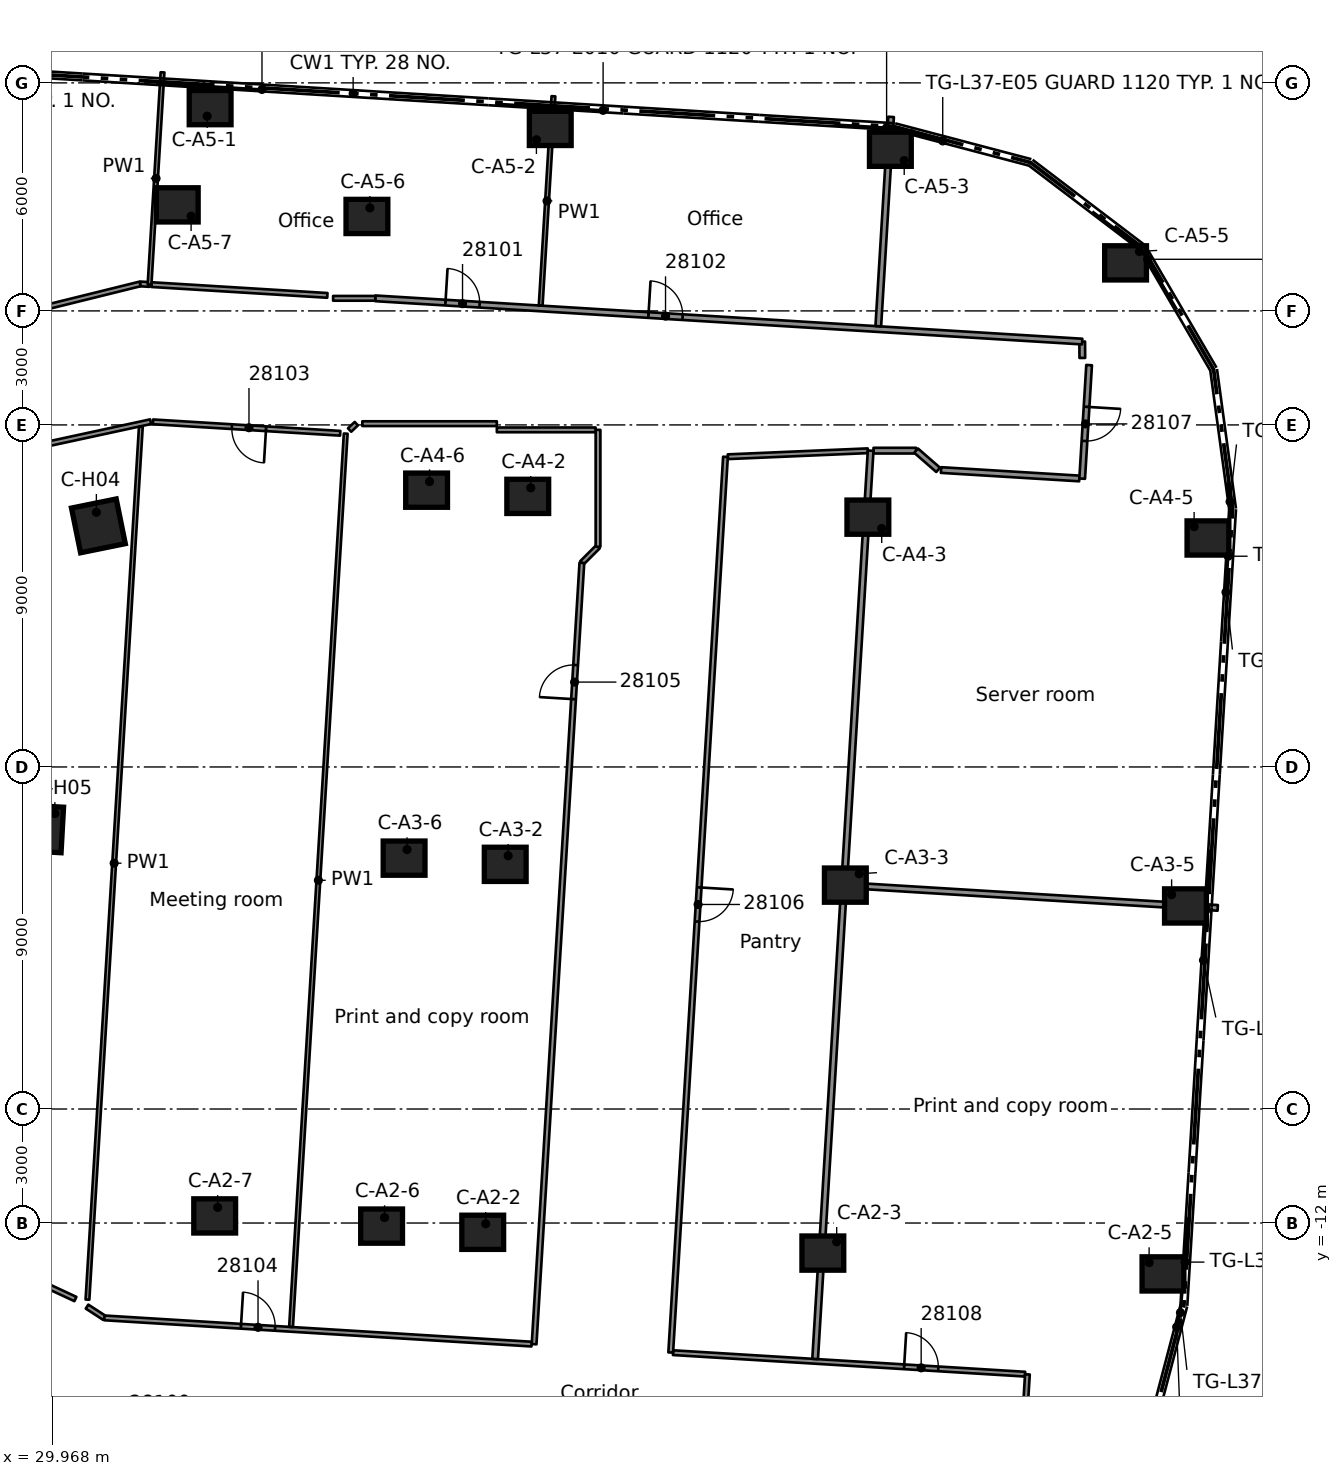
"""IFC4 building model, lengths in metres.
Left out: names, types, materials, properties, quantities, classifications, styles, units other than length and angle.
Written with IfcOpenShell. Run it as: python <this file> out.ifc"""

import sys

from ifc_helpers import new_model, si_unit, direction, frame, frame_2d, origin, origin_2d, place, context, subcontext, project, spatial, rectangle, extrude, element, fill, save


model = new_model("IFC4")
c1 = context("Model", 3, precision=1e-05, world=origin(), true_north=direction((0.0, 1.0)))
c2 = subcontext(c1, "Body", "Model", "MODEL_VIEW")
j1 = project(units=[si_unit("LENGTHUNIT", "METRE"), si_unit("PLANEANGLEUNIT", "RADIAN")], contexts=[c1])
p1 = place(None, origin())
s1 = spatial("IfcSite", under=j1, at=p1, CompositionType="ELEMENT")
p2 = place(p1, origin())
s2 = spatial("IfcBuilding", under=s1, at=p2, CompositionType="ELEMENT")
p3 = place(p2, frame((0.0, 0.0, 145.6)))
s3 = spatial("IfcBuildingStorey", under=s2, at=p3, CompositionType="ELEMENT", Elevation=145.6)
for number, where, z_axis, x_axis in (
    (1, (41.296, -12.244, 0.0), (0.0, 0.0, 1.0), (1.0, 0.0, 0.0)),
    (2, (50.246, -12.791, 0.0), (0.0, 0.0, 1.0), (1.0, 0.0, 0.0)),
    (3, (59.196, -13.339, 0.0), (0.0, 0.0, 1.0), (1.0, 0.0, 0.0)),
    (4, (38.635, -12.081, 0.0), (0.0, 0.0, 1.0), (1.0, 0.0, 0.0)),
    (5, (34.243, -11.813, 0.0), (0.0, 0.0, 1.0), (1.0, 0.0, 0.0)),
    (6, (41.888, -2.562, 0.0), (0.0, 0.0, 1.0), (1.0, 0.0, 0.0)),
    (7, (50.838, -3.109, 0.0), (0.0, 0.0, 1.0), (1.0, 0.0, 0.0)),
    (8, (59.788, -3.657, 0.0), (0.0, 0.0, 1.0), (1.0, 0.0, 0.0)),
    (9, (39.227, -2.399, 0.0), (0.0, 0.0, 1.0), (1.0, 0.0, 0.0)),
    (10, (42.481, 7.12, 0.0), (0.0, 0.0, 1.0), (1.0, 0.0, 0.0)),
    (11, (51.431, 6.573, 0.0), (0.0, 0.0, 1.0), (1.0, 0.0, 0.0)),
    (12, (60.38, 6.025, 0.0), (0.0, 0.0, 1.0), (1.0, 0.0, 0.0)),
    (13, (39.819, 7.283, 0.0), (0.0, 0.0, 1.0), (1.0, 0.0, 0.0)),
    (14, (34.123, 17.349, 0.0), (0.0, 0.0, 1.0), (1.0, 0.0, 0.0)),
    (15, (43.073, 16.802, 0.0), (0.0, 0.0, 1.0), (1.0, 0.0, 0.0)),
    (16, (52.023, 16.254, 0.0), (0.0, 0.0, 1.0), (1.0, 0.0, 0.0)),
    (17, (58.212, 13.264, 0.0), (0.0, 0.0, 1.0), (1.0, 0.0, 0.0)),
    (18, (38.249, 14.485, 0.0), (0.0, 0.0, 1.0), (1.0, 0.0, 0.0)),
    (19, (33.258, 14.79, 0.0), (0.0, 0.0, 1.0), (1.0, 0.0, 0.0)),
):
    element("IfcColumn", number, at=place(p3, frame(where, z_axis=z_axis, x_axis=x_axis)), inside=s3, PredefinedType="COLUMN", context=c2, shape_type="SweptSolid", body=[
        extrude(rectangle(XDim=1.1, YDim=0.9, at=origin_2d()), origin(), (0.0, 0.0, 1.0), 3.5),
    ])
for number, where, z_axis, x_axis in (
    (20, (31.183, 6.344, 0.0), (0.0, 0.0, 1.0), (0.98, 0.199, 0.0)),
    (21, (29.634, -1.625, 0.0), (0.0, 0.0, 1.0), (0.998, -0.055, 0.0)),
):
    element("IfcColumn", number, at=place(p3, frame(where, z_axis=z_axis, x_axis=x_axis)), inside=s3, PredefinedType="COLUMN", context=c2, shape_type="SweptSolid", body=[
        extrude(rectangle(XDim=1.2, YDim=1.2, at=origin_2d()), origin(), (0.0, 0.0, 1.0), 3.5),
    ])
p4 = place(p3, frame((57.071, 11.193, 0.0), z_axis=(0.0, 0.0, 1.0), x_axis=(0.006794860122, -0.999976914671, 0.0)))
e22 = element("IfcWall", 22, at=p4, inside=s3, PredefinedType="PARTITIONING", context=c2, shape_type="SweptSolid", body=[
    extrude(rectangle(XDim=0.431, YDim=0.15, at=frame_2d((0.216, 0.0))), origin(), (0.0, 0.0, 1.0), 3.08),
])
p5 = place(p3, frame((26.05, -14.969, 0.0), z_axis=(0.0, 0.0, 1.0), x_axis=(0.802733003706, -0.596338599087, 0.0)))
e23 = element("IfcWall", 23, at=p5, inside=s3, PredefinedType="PARTITIONING", context=c2, shape_type="SweptSolid", body=[
    extrude(rectangle(XDim=4.927, YDim=0.125, at=frame_2d((2.463, 0.0))), origin(), (0.0, 0.0, 1.0), 3.08),
])
p6 = place(p3, frame((30.578, -14.0, 0.0), z_axis=(0.0, 0.0, 1.0), x_axis=(-0.906684476779, 0.421809506257, 0.0)))
e24 = element("IfcWall", 24, at=p6, inside=s3, PredefinedType="PARTITIONING", context=c2, shape_type="SweptSolid", body=[
    extrude(rectangle(XDim=5.927, YDim=0.125, at=frame_2d((2.963, 0.0))), origin(), (0.0, 0.0, 1.0), 3.08),
])
p7 = place(p3, frame((30.884, -14.199, 0.0), z_axis=(0.0, 0.0, 1.0), x_axis=(0.838402684299, -0.545051317731, 0.0)))
e25 = element("IfcWall", 25, at=p7, inside=s3, PredefinedType="PARTITIONING", context=c2, shape_type="SweptSolid", body=[
    extrude(rectangle(XDim=0.545, YDim=0.125, at=frame_2d((0.272, 0.0))), origin(), (0.0, 0.0, 1.0), 3.08),
])
p8 = place(p3, frame((31.341, -14.496, 0.0), z_axis=(0.0, 0.0, 1.0), x_axis=(0.998121712121, -0.061262123633, 0.0)))
e26 = element("IfcWall", 26, at=p8, inside=s3, PredefinedType="PARTITIONING", context=c2, shape_type="SweptSolid", body=[
    extrude(rectangle(XDim=11.262, YDim=0.125, at=frame_2d((5.631, 0.0))), origin(), (0.0, 0.0, 1.0), 3.08),
])
p9 = place(p8, frame((3.6, 0.0, 0.0)))
e27 = element("IfcOpeningElement", 27, at=p9, cuts=e26, PredefinedType="OPENING", context=c2, shape_type="SweptSolid", body=[
    extrude(rectangle(XDim=0.9, YDim=2.1, at=frame_2d((0.45, 1.05))), frame((0.0, 0.073, 0.0), z_axis=(0.0, -1.0, 0.0), x_axis=(1.0, 0.0, 0.0)), (0.0, 0.0, 1.0), 0.145),
])
p10 = place(p3, frame((46.305, -15.411, 0.0), z_axis=(0.0, 0.0, 1.0), x_axis=(0.998136924193, -0.061013773551, 0.0)))
e28 = element("IfcWall", 28, at=p10, inside=s3, PredefinedType="PARTITIONING", context=c2, shape_type="SweptSolid", body=[
    extrude(rectangle(XDim=9.279, YDim=0.125, at=frame_2d((4.64, 0.0))), origin(), (0.0, 0.0, 1.0), 3.08),
])
p11 = place(p10, frame((6.091, 0.0, 0.0)))
e29 = element("IfcOpeningElement", 29, at=p11, cuts=e28, PredefinedType="OPENING", context=c2, shape_type="SweptSolid", body=[
    extrude(rectangle(XDim=0.9, YDim=2.1, at=frame_2d((0.45, 1.05))), frame((0.0, 0.073, 0.0), z_axis=(0.0, -1.0, 0.0), x_axis=(1.0, 0.0, 0.0)), (0.0, 0.0, 1.0), 0.145),
])
p12 = place(p3, frame((50.88, -3.112, 0.0), z_axis=(0.0, 0.0, 1.0), x_axis=(0.998139914639, -0.060964832519, 0.0)))
e30 = element("IfcWall", 30, at=p12, inside=s3, PredefinedType="PARTITIONING", context=c2, shape_type="SweptSolid", body=[
    extrude(rectangle(XDim=9.775, YDim=0.15, at=frame_2d((4.888, 0.0))), origin(), (0.0, 0.0, 1.0), 3.08),
])
p13 = place(p3, frame((37.546, 8.78, 0.0), z_axis=(0.0, 0.0, 1.0), x_axis=(-0.998138783045, 0.060983356598, 0.0)))
e31 = element("IfcWall", 31, at=p13, inside=s3, PredefinedType="PARTITIONING", context=c2, shape_type="SweptSolid", body=[
    extrude(rectangle(XDim=4.936, YDim=0.125, at=frame_2d((2.468, 0.0))), origin(), (0.0, 0.0, 1.0), 3.08),
])
p14 = place(p13, frame((1.955, 0.0, 0.0)))
e32 = element("IfcOpeningElement", 32, at=p14, cuts=e31, PredefinedType="OPENING", context=c2, shape_type="SweptSolid", body=[
    extrude(rectangle(XDim=0.9, YDim=2.1, at=frame_2d((0.45, 1.05))), frame((0.0, 0.073, 0.0), z_axis=(0.0, -1.0, 0.0), x_axis=(1.0, 0.0, 0.0)), (0.0, 0.0, 1.0), 0.145),
])
p15 = place(p3, frame((53.356, 7.813, 0.0), z_axis=(0.0, 0.0, 1.0), x_axis=(0.998145758493, -0.060869079194, 0.0)))
e33 = element("IfcWall", 33, at=p15, inside=s3, PredefinedType="PARTITIONING", context=c2, shape_type="SweptSolid", body=[
    extrude(rectangle(XDim=3.646, YDim=0.15, at=frame_2d((1.823, 0.0))), origin(), (0.0, 0.0, 1.0), 3.08),
])
p16 = place(p3, frame((32.281, 12.71, 0.0), z_axis=(0.0, 0.0, 1.0), x_axis=(0.998202495197, -0.059931449023, 0.0)))
e34 = element("IfcWall", 34, at=p16, inside=s3, PredefinedType="PARTITIONING", context=c2, shape_type="SweptSolid", body=[
    extrude(rectangle(XDim=0.249, YDim=0.125, at=frame_2d((0.124, 0.0))), origin(), (0.0, 0.0, 1.0), 3.08),
])
p17 = place(p3, frame((38.469, 12.331, 0.0), z_axis=(0.0, 0.0, 1.0), x_axis=(0.998133984111, -0.061061851948, 0.0)))
e35 = element("IfcWall", 35, at=p17, inside=s3, PredefinedType="PARTITIONING", context=c2, shape_type="SweptSolid", body=[
    extrude(rectangle(XDim=18.636, YDim=0.15, at=frame_2d((9.318, 0.0))), origin(), (0.0, 0.0, 1.0), 3.08),
])
p18 = place(p17, frame((1.85, 0.0, 0.0)))
e36 = element("IfcOpeningElement", 36, at=p18, cuts=e35, PredefinedType="OPENING", context=c2, shape_type="SweptSolid", body=[
    extrude(rectangle(XDim=0.9, YDim=2.1, at=frame_2d((0.45, 1.05))), frame((0.0, 0.085, 0.0), z_axis=(0.0, -1.0, 0.0), x_axis=(1.0, 0.0, 0.0)), (0.0, 0.0, 1.0), 0.17),
])
p19 = place(p17, frame((7.202, 0.0, 0.0)))
e37 = element("IfcOpeningElement", 37, at=p19, cuts=e35, PredefinedType="OPENING", context=c2, shape_type="SweptSolid", body=[
    extrude(rectangle(XDim=0.9, YDim=2.1, at=frame_2d((0.45, 1.05))), frame((0.0, 0.085, 0.0), z_axis=(0.0, -1.0, 0.0), x_axis=(1.0, 0.0, 0.0)), (0.0, 0.0, 1.0), 0.17),
])
p20 = place(p3, frame((32.579, 12.692, 0.0), z_axis=(0.0, 0.0, 1.0), x_axis=(0.99812401512, -0.061224590168, 0.0)))
e38 = element("IfcWall", 38, at=p20, inside=s3, PredefinedType="PARTITIONING", context=c2, shape_type="SweptSolid", body=[
    extrude(rectangle(XDim=4.638, YDim=0.125, at=frame_2d((2.319, 0.0))), origin(), (0.0, 0.0, 1.0), 3.08),
])
p21 = place(p3, frame((43.906, 5.371, 0.0), z_axis=(0.0, 0.0, 1.0), x_axis=(0.707310353012, 0.706903150737, 0.0)))
e39 = element("IfcWall", 39, at=p21, inside=s3, PredefinedType="PARTITIONING", context=c2, shape_type="SweptSolid", body=[
    extrude(rectangle(XDim=0.6, YDim=0.125, at=frame_2d((0.3, 0.0))), origin(), (0.0, 0.0, 1.0), 3.08),
])
p22 = place(p3, frame((51.579, 8.323, 0.0), z_axis=(0.0, 0.0, 1.0), x_axis=(1.0, 0.0, 0.0)))
e40 = element("IfcWall", 40, at=p22, inside=s3, PredefinedType="PARTITIONING", context=c2, shape_type="SweptSolid", body=[
    extrude(rectangle(XDim=1.121, YDim=0.15, at=frame_2d((0.561, 0.0))), origin(), (0.0, 0.0, 1.0), 3.08),
])
p23 = place(p3, frame((41.668, 8.87, 0.0), z_axis=(0.0, 0.0, 1.0), x_axis=(1.0, 0.0, 0.0)))
e41 = element("IfcWall", 41, at=p23, inside=s3, PredefinedType="PARTITIONING", context=c2, shape_type="SweptSolid", body=[
    extrude(rectangle(XDim=2.599, YDim=0.125, at=frame_2d((1.3, 0.0))), origin(), (0.0, 0.0, 1.0), 3.08),
])
p24 = place(p3, frame((38.128, 9.033, 0.0), z_axis=(0.0, 0.0, 1.0), x_axis=(1.0, 0.0, 0.0)))
e42 = element("IfcWall", 42, at=p24, inside=s3, PredefinedType="PARTITIONING", context=c2, shape_type="SweptSolid", body=[
    extrude(rectangle(XDim=3.54, YDim=0.125, at=frame_2d((1.77, 0.0))), origin(), (0.0, 0.0, 1.0), 3.08),
])
p25 = place(p3, frame((37.359, 12.331, 0.0), z_axis=(0.0, 0.0, 1.0), x_axis=(1.0, 0.0, 0.0)))
e43 = element("IfcWall", 43, at=p25, inside=s3, PredefinedType="PARTITIONING", context=c2, shape_type="SweptSolid", body=[
    extrude(rectangle(XDim=1.11, YDim=0.125, at=frame_2d((0.555, 0.0))), origin(), (0.0, 0.0, 1.0), 3.08),
])
p26 = place(p3, frame((47.746, 8.163, 0.0), z_axis=(0.0, 0.0, 1.0), x_axis=(0.999092785442, 0.042586454162, 0.0)))
e44 = element("IfcWall", 44, at=p26, inside=s3, PredefinedType="PARTITIONING", context=c2, shape_type="SweptSolid", body=[
    extrude(rectangle(XDim=3.686, YDim=0.125, at=frame_2d((1.843, 0.0))), origin(), (0.0, 0.0, 1.0), 3.08),
])
p27 = place(p3, frame((29.044, 8.325, 0.0), z_axis=(0.0, 0.0, 1.0), x_axis=(0.977387992434, 0.211453806411, 0.0)))
e45 = element("IfcWall", 45, at=p27, inside=s3, PredefinedType="PARTITIONING", context=c2, shape_type="SweptSolid", body=[
    extrude(rectangle(XDim=3.594, YDim=0.125, at=frame_2d((1.797, 0.0))), origin(), (0.0, 0.0, 1.0), 3.08),
])
p28 = place(p3, frame((32.281, 12.71, 0.0), z_axis=(0.0, 0.0, 1.0), x_axis=(-0.970728736882, -0.240178515673, 0.0)))
e46 = element("IfcWall", 46, at=p28, inside=s3, PredefinedType="PARTITIONING", context=c2, shape_type="SweptSolid", body=[
    extrude(rectangle(XDim=4.218, YDim=0.125, at=frame_2d((2.109, 0.0))), origin(), (0.0, 0.0, 1.0), 3.08),
])
p29 = place(p3, frame((37.793, 8.866, 0.0), z_axis=(0.0, 0.0, 1.0), x_axis=(0.727374754597, 0.68624045813, 0.0)))
e47 = element("IfcWall", 47, at=p29, inside=s3, PredefinedType="PARTITIONING", context=c2, shape_type="SweptSolid", body=[
    extrude(rectangle(XDim=0.243, YDim=0.125, at=frame_2d((0.122, 0.0))), origin(), (0.0, 0.0, 1.0), 3.08),
])
p30 = place(p3, frame((55.474, -18.51, 0.0), z_axis=(0.0, 0.0, 1.0), x_axis=(0.061112023101, 0.998130913574, 0.0)))
e48 = element("IfcWall", 48, at=p30, inside=s3, PredefinedType="PARTITIONING", context=c2, shape_type="SweptSolid", body=[
    extrude(rectangle(XDim=2.533, YDim=0.125, at=frame_2d((1.266, 0.0))), origin(), (0.0, 0.0, 1.0), 3.08),
])
p31 = place(p3, frame((57.253, 10.574, 0.0), z_axis=(0.0, 0.0, 1.0), x_axis=(-0.061083533007, -0.998132657514, 0.0)))
e49 = element("IfcWall", 49, at=p31, inside=s3, PredefinedType="PARTITIONING", context=c2, shape_type="SweptSolid", body=[
    extrude(rectangle(XDim=2.994, YDim=0.15, at=frame_2d((1.497, 0.0))), origin(), (0.0, 0.0, 1.0), 3.08),
])
p32 = place(p31, frame((1.1, 0.0, 0.0)))
e50 = element("IfcOpeningElement", 50, at=p32, cuts=e49, PredefinedType="OPENING", context=c2, shape_type="SweptSolid", body=[
    extrude(rectangle(XDim=0.9, YDim=2.1, at=frame_2d((0.45, 1.05))), frame((0.0, 0.085, 0.0), z_axis=(0.0, -1.0, 0.0), x_axis=(1.0, 0.0, 0.0)), (0.0, 0.0, 1.0), 0.17),
])
p33 = place(p3, frame((50.043, -15.577, 0.0), z_axis=(0.0, 0.0, 1.0), x_axis=(0.061013458126, 0.998136943474, 0.0)))
e51 = element("IfcWall", 51, at=p33, inside=s3, PredefinedType="PARTITIONING", context=c2, shape_type="SweptSolid", body=[
    extrude(rectangle(XDim=23.945, YDim=0.15, at=frame_2d((11.972, 0.0))), origin(), (0.0, 0.0, 1.0), 3.08),
])
p34 = place(p3, frame((51.705, 11.597, 0.0), z_axis=(0.0, 0.0, 1.0), x_axis=(0.060877083992, 0.998145270311, 0.0)))
e52 = element("IfcWall", 52, at=p34, inside=s3, PredefinedType="PARTITIONING", context=c2, shape_type="SweptSolid", body=[
    extrude(rectangle(XDim=5.518, YDim=0.15, at=frame_2d((2.759, 0.0))), origin(), (0.0, 0.0, 1.0), 3.08),
])
p35 = place(p3, frame((47.684, 8.16, 0.0), z_axis=(0.0, 0.0, 1.0), x_axis=(-0.061037952317, -0.998135445907, 0.0)))
e53 = element("IfcWall", 53, at=p35, inside=s3, PredefinedType="PARTITIONING", context=c2, shape_type="SweptSolid", body=[
    extrude(rectangle(XDim=23.611, YDim=0.125, at=frame_2d((11.805, 0.0))), origin(), (0.0, 0.0, 1.0), 3.08),
])
p36 = place(p35, frame((11.35, 0.0, 0.0)))
e54 = element("IfcOpeningElement", 54, at=p36, cuts=e53, PredefinedType="OPENING", context=c2, shape_type="SweptSolid", body=[
    extrude(rectangle(XDim=0.9, YDim=2.1, at=frame_2d((0.45, 1.05))), frame((0.0, 0.073, 0.0), z_axis=(0.0, -1.0, 0.0), x_axis=(1.0, 0.0, 0.0)), (0.0, 0.0, 1.0), 0.145),
])
p37 = place(p3, frame((42.648, -15.188, 0.0), z_axis=(0.0, 0.0, 1.0), x_axis=(0.061030776278, 0.998135884711, 0.0)))
e55 = element("IfcWall", 55, at=p37, inside=s3, PredefinedType="PARTITIONING", context=c2, shape_type="SweptSolid", body=[
    extrude(rectangle(XDim=20.597, YDim=0.125, at=frame_2d((10.299, 0.0))), origin(), (0.0, 0.0, 1.0), 3.08),
])
p38 = place(p37, frame((17.004, 0.0, 0.0)))
e56 = element("IfcOpeningElement", 56, at=p38, cuts=e55, PredefinedType="OPENING", context=c2, shape_type="SweptSolid", body=[
    extrude(rectangle(XDim=0.9, YDim=2.1, at=frame_2d((0.45, 1.05))), frame((0.0, 0.073, 0.0), z_axis=(0.0, -1.0, 0.0), x_axis=(1.0, 0.0, 0.0)), (0.0, 0.0, 1.0), 0.145),
])
p39 = place(p3, frame((42.821, 12.14, 0.0), z_axis=(0.0, 0.0, 1.0), x_axis=(0.060877083992, 0.998145270311, 0.0)))
e57 = element("IfcWall", 57, at=p39, inside=s3, PredefinedType="PARTITIONING", context=c2, shape_type="SweptSolid", body=[
    extrude(rectangle(XDim=5.518, YDim=0.1, at=frame_2d((2.759, 0.0))), origin(), (0.0, 0.0, 1.0), 3.08),
])
p40 = place(p3, frame((36.252, -14.735, 0.0), z_axis=(0.0, 0.0, 1.0), x_axis=(0.061102264475, 0.998131511012, 0.0)))
e58 = element("IfcWall", 58, at=p40, inside=s3, PredefinedType="PARTITIONING", context=c2, shape_type="SweptSolid", body=[
    extrude(rectangle(XDim=23.55, YDim=0.1, at=frame_2d((11.775, 0.0))), origin(), (0.0, 0.0, 1.0), 3.08),
])
p41 = place(p3, frame((30.895, -14.015, 0.0), z_axis=(0.0, 0.0, 1.0), x_axis=(0.061064974054, 0.998133793108, 0.0)))
e59 = element("IfcWall", 59, at=p41, inside=s3, PredefinedType="PARTITIONING", context=c2, shape_type="SweptSolid", body=[
    extrude(rectangle(XDim=23.009, YDim=0.1, at=frame_2d((11.504, 0.0))), origin(), (0.0, 0.0, 1.0), 3.08),
])
p42 = place(p3, frame((32.529, 12.695, 0.0), z_axis=(0.0, 0.0, 1.0), x_axis=(0.060986686306, 0.998138579604, 0.0)))
e60 = element("IfcWall", 60, at=p42, inside=s3, PredefinedType="PARTITIONING", context=c2, shape_type="SweptSolid", body=[
    extrude(rectangle(XDim=5.593, YDim=0.1, at=frame_2d((2.796, 0.0))), origin(), (0.0, 0.0, 1.0), 3.08),
])
p43 = place(p3, frame((53.28, 7.818, 0.0), z_axis=(0.0, 0.0, 1.0), x_axis=(-0.754304719431, 0.656524478023, 0.0)))
e61 = element("IfcWall", 61, at=p43, inside=s3, PredefinedType="PARTITIONING", context=c2, shape_type="SweptSolid", body=[
    extrude(rectangle(XDim=0.769, YDim=0.15, at=frame_2d((0.385, 0.0))), origin(), (0.0, 0.0, 1.0), 3.08),
])
p44 = place(p3, frame((44.33, 5.795, 0.0), z_axis=(0.0, 0.0, 1.0), x_axis=(0.0, 1.0, 0.0)))
e62 = element("IfcWall", 62, at=p44, inside=s3, PredefinedType="PARTITIONING", context=c2, shape_type="SweptSolid", body=[
    extrude(rectangle(XDim=3.075, YDim=0.125, at=frame_2d((1.538, 0.0))), origin(), (0.0, 0.0, 1.0), 3.08),
])
p45 = place(p18, origin())
e63 = element("IfcDoor", 63, at=p45, inside=s3, OperationType="SINGLE_SWING_LEFT", PredefinedType="DOOR", context=c2, shape_type="SweptSolid", body=[
    extrude(rectangle(XDim=0.9, YDim=2.1, at=frame_2d((0.45, 1.05))), frame((0.0, 0.025, 0.0), z_axis=(0.0, -1.0, 0.0), x_axis=(1.0, 0.0, 0.0)), (0.0, 0.0, 1.0), 0.05),
])
fill(e36, e63)
p46 = place(p19, origin())
e64 = element("IfcDoor", 64, at=p46, inside=s3, OperationType="SINGLE_SWING_LEFT", PredefinedType="DOOR", context=c2, shape_type="SweptSolid", body=[
    extrude(rectangle(XDim=0.9, YDim=2.1, at=frame_2d((0.45, 1.05))), frame((0.0, 0.025, 0.0), z_axis=(0.0, -1.0, 0.0), x_axis=(1.0, 0.0, 0.0)), (0.0, 0.0, 1.0), 0.05),
])
fill(e37, e64)
p47 = place(p14, origin())
e65 = element("IfcDoor", 65, at=p47, inside=s3, OperationType="SINGLE_SWING_LEFT", PredefinedType="DOOR", context=c2, shape_type="SweptSolid", body=[
    extrude(rectangle(XDim=0.9, YDim=2.1, at=frame_2d((0.45, 1.05))), frame((0.0, 0.025, 0.0), z_axis=(0.0, -1.0, 0.0), x_axis=(1.0, 0.0, 0.0)), (0.0, 0.0, 1.0), 0.05),
])
fill(e32, e65)
p48 = place(p9, origin())
e66 = element("IfcDoor", 66, at=p48, inside=s3, OperationType="SINGLE_SWING_LEFT", PredefinedType="DOOR", context=c2, shape_type="SweptSolid", body=[
    extrude(rectangle(XDim=0.9, YDim=2.1, at=frame_2d((0.45, 1.05))), frame((0.0, 0.025, 0.0), z_axis=(0.0, -1.0, 0.0), x_axis=(1.0, 0.0, 0.0)), (0.0, 0.0, 1.0), 0.05),
])
fill(e27, e66)
p49 = place(p38, origin())
e67 = element("IfcDoor", 67, at=p49, inside=s3, OperationType="SINGLE_SWING_RIGHT", PredefinedType="DOOR", context=c2, shape_type="SweptSolid", body=[
    extrude(rectangle(XDim=0.9, YDim=2.1, at=frame_2d((0.45, 1.05))), frame((0.0, 0.025, 0.0), z_axis=(0.0, -1.0, 0.0), x_axis=(1.0, 0.0, 0.0)), (0.0, 0.0, 1.0), 0.05),
])
fill(e56, e67)
p50 = place(p36, origin())
e68 = element("IfcDoor", 68, at=p50, inside=s3, OperationType="SINGLE_SWING_LEFT", PredefinedType="DOOR", context=c2, shape_type="SweptSolid", body=[
    extrude(rectangle(XDim=0.9, YDim=2.1, at=frame_2d((0.45, 1.05))), frame((0.0, 0.025, 0.0), z_axis=(0.0, -1.0, 0.0), x_axis=(1.0, 0.0, 0.0)), (0.0, 0.0, 1.0), 0.05),
])
fill(e54, e68)
p51 = place(p32, origin())
e69 = element("IfcDoor", 69, at=p51, inside=s3, OperationType="SINGLE_SWING_RIGHT", PredefinedType="DOOR", context=c2, shape_type="SweptSolid", body=[
    extrude(rectangle(XDim=0.9, YDim=2.1, at=frame_2d((0.45, 1.05))), frame((0.0, 0.025, 0.0), z_axis=(0.0, -1.0, 0.0), x_axis=(1.0, 0.0, 0.0)), (0.0, 0.0, 1.0), 0.05),
])
fill(e50, e69)
p52 = place(p11, origin())
e70 = element("IfcDoor", 70, at=p52, inside=s3, OperationType="SINGLE_SWING_RIGHT", PredefinedType="DOOR", context=c2, shape_type="SweptSolid", body=[
    extrude(rectangle(XDim=0.9, YDim=2.1, at=frame_2d((0.45, 1.05))), frame((0.0, 0.025, 0.0), z_axis=(0.0, -1.0, 0.0), x_axis=(1.0, 0.0, 0.0)), (0.0, 0.0, 1.0), 0.05),
])
fill(e29, e70)
save(model, sys.argv[1])
